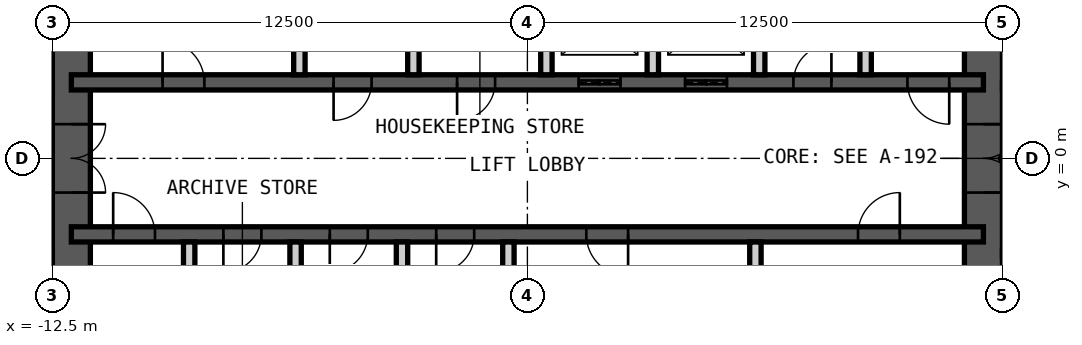
"""IFC4 building model, lengths in metres.
Left out: names, types, materials, properties, quantities, classifications, styles, units other than length and angle.
Written with IfcOpenShell. Run it as: python <this file> out.ifc"""

import sys

from ifc_helpers import new_model, si_unit, direction, frame, frame_2d, origin, place, context, subcontext, project, spatial, rectangle, extrude, element, fill, save


model = new_model("IFC4")
c1 = context("Model", 3, precision=1e-05, world=origin(), true_north=direction((0.0, 1.0)))
c2 = subcontext(c1, "Body", "Model", "MODEL_VIEW")
j1 = project(units=[si_unit("LENGTHUNIT", "METRE"), si_unit("PLANEANGLEUNIT", "RADIAN")], contexts=[c1])
p1 = place(None, origin())
s1 = spatial("IfcSite", under=j1, at=p1, CompositionType="ELEMENT")
p2 = place(p1, origin())
s2 = spatial("IfcBuilding", under=s1, at=p2, CompositionType="ELEMENT")
p3 = place(p2, frame((0.0, 0.0, 283.0)))
s3 = spatial("IfcBuildingStorey", under=s2, at=p3, CompositionType="ELEMENT", Elevation=283.0)
p4 = place(p3, frame((12.0, -9.0, 0.0), z_axis=(0.0, 0.0, 1.0), x_axis=(0.0, 1.0, 0.0)))
e1 = element("IfcWall", 1, at=p4, inside=s3, PredefinedType="SHEAR", context=c2, shape_type="SweptSolid", body=[
    extrude(rectangle(XDim=18.0, YDim=1.0, at=frame_2d((9.0, 0.0))), origin(), (0.0, 0.0, 1.0), 4.2),
])
p5 = place(p4, frame((8.1, 0.0, 0.0)))
e2 = element("IfcOpeningElement", 2, at=p5, cuts=e1, PredefinedType="OPENING", context=c2, shape_type="SweptSolid", body=[
    extrude(rectangle(XDim=1.8, YDim=2.1, at=frame_2d((0.9, 1.05))), frame((0.0, 0.51, 0.0), z_axis=(0.0, -1.0, 0.0), x_axis=(1.0, 0.0, 0.0)), (0.0, 0.0, 1.0), 1.02),
])
p6 = place(p3, frame((-12.0, -9.0, 0.0), z_axis=(0.0, 0.0, 1.0), x_axis=(0.0, 1.0, 0.0)))
e3 = element("IfcWall", 3, at=p6, inside=s3, PredefinedType="SHEAR", context=c2, shape_type="SweptSolid", body=[
    extrude(rectangle(XDim=18.0, YDim=1.0, at=frame_2d((9.0, 0.0))), origin(), (0.0, 0.0, 1.0), 4.2),
])
p7 = place(p6, frame((8.1, 0.0, 0.0)))
e4 = element("IfcOpeningElement", 4, at=p7, cuts=e3, PredefinedType="OPENING", context=c2, shape_type="SweptSolid", body=[
    extrude(rectangle(XDim=1.8, YDim=2.1, at=frame_2d((0.9, 1.05))), frame((0.0, 0.51, 0.0), z_axis=(0.0, -1.0, 0.0), x_axis=(1.0, 0.0, 0.0)), (0.0, 0.0, 1.0), 1.02),
])
p8 = place(p3, frame((-12.0, 2.0, 0.0), z_axis=(0.0, 0.0, 1.0), x_axis=(1.0, 0.0, 0.0)))
e5 = element("IfcWall", 5, at=p8, inside=s3, PredefinedType="SHEAR", context=c2, shape_type="SweptSolid", body=[
    extrude(rectangle(XDim=24.0, YDim=0.4, at=frame_2d((12.0, 0.0))), origin(), (0.0, 0.0, 1.0), 4.2),
])
p9 = place(p8, frame((2.4, 0.0, 0.0)))
e6 = element("IfcOpeningElement", 6, at=p9, cuts=e5, PredefinedType="OPENING", context=c2, shape_type="SweptSolid", body=[
    extrude(rectangle(XDim=1.1, YDim=2.1, at=frame_2d((0.55, 1.05))), frame((0.0, 0.21, 0.0), z_axis=(0.0, -1.0, 0.0), x_axis=(1.0, 0.0, 0.0)), (0.0, 0.0, 1.0), 0.42),
])
p10 = place(p8, frame((22.0, 0.0, 0.0)))
e7 = element("IfcOpeningElement", 7, at=p10, cuts=e5, PredefinedType="OPENING", context=c2, shape_type="SweptSolid", body=[
    extrude(rectangle(XDim=1.1, YDim=2.1, at=frame_2d((0.55, 1.05))), frame((0.0, 0.21, 0.0), z_axis=(0.0, -1.0, 0.0), x_axis=(1.0, 0.0, 0.0)), (0.0, 0.0, 1.0), 0.42),
])
p11 = place(p8, frame((10.15, 0.0, 0.0)))
e8 = element("IfcOpeningElement", 8, at=p11, cuts=e5, PredefinedType="OPENING", context=c2, shape_type="SweptSolid", body=[
    extrude(rectangle(XDim=1.0, YDim=2.1, at=frame_2d((0.5, 1.05))), frame((0.0, 0.21, 0.0), z_axis=(0.0, -1.0, 0.0), x_axis=(1.0, 0.0, 0.0)), (0.0, 0.0, 1.0), 0.42),
])
p12 = place(p8, frame((6.9, 0.0, 0.0)))
e9 = element("IfcOpeningElement", 9, at=p12, cuts=e5, PredefinedType="OPENING", context=c2, shape_type="SweptSolid", body=[
    extrude(rectangle(XDim=1.0, YDim=2.1, at=frame_2d((0.5, 1.05))), frame((0.0, 0.21, 0.0), z_axis=(0.0, -1.0, 0.0), x_axis=(1.0, 0.0, 0.0)), (0.0, 0.0, 1.0), 0.42),
])
p13 = place(p8, frame((13.35, 0.0, 0.0)))
e10 = element("IfcOpeningElement", 10, at=p13, cuts=e5, PredefinedType="OPENING", context=c2, shape_type="SweptSolid", body=[
    extrude(rectangle(XDim=1.1, YDim=2.4, at=frame_2d((0.55, 1.2))), frame((0.0, 0.21, 0.0), z_axis=(0.0, -1.0, 0.0), x_axis=(1.0, 0.0, 0.0)), (0.0, 0.0, 1.0), 0.42),
])
p14 = place(p8, frame((16.15, 0.0, 0.0)))
e11 = element("IfcOpeningElement", 11, at=p14, cuts=e5, PredefinedType="OPENING", context=c2, shape_type="SweptSolid", body=[
    extrude(rectangle(XDim=1.1, YDim=2.4, at=frame_2d((0.55, 1.2))), frame((0.0, 0.21, 0.0), z_axis=(0.0, -1.0, 0.0), x_axis=(1.0, 0.0, 0.0)), (0.0, 0.0, 1.0), 0.42),
])
p15 = place(p8, frame((19.0, 0.0, 0.0)))
e12 = element("IfcOpeningElement", 12, at=p15, cuts=e5, PredefinedType="OPENING", context=c2, shape_type="SweptSolid", body=[
    extrude(rectangle(XDim=1.0, YDim=2.1, at=frame_2d((0.5, 1.05))), frame((0.0, 0.21, 0.0), z_axis=(0.0, -1.0, 0.0), x_axis=(1.0, 0.0, 0.0)), (0.0, 0.0, 1.0), 0.42),
])
p16 = place(p3, frame((-12.0, -2.0, 0.0), z_axis=(0.0, 0.0, 1.0), x_axis=(1.0, 0.0, 0.0)))
e13 = element("IfcWall", 13, at=p16, inside=s3, PredefinedType="SHEAR", context=c2, shape_type="SweptSolid", body=[
    extrude(rectangle(XDim=24.0, YDim=0.4, at=frame_2d((12.0, 0.0))), origin(), (0.0, 0.0, 1.0), 4.2),
])
p17 = place(p16, frame((1.1, 0.0, 0.0)))
e14 = element("IfcOpeningElement", 14, at=p17, cuts=e13, PredefinedType="OPENING", context=c2, shape_type="SweptSolid", body=[
    extrude(rectangle(XDim=1.1, YDim=2.1, at=frame_2d((0.55, 1.05))), frame((0.0, 0.21, 0.0), z_axis=(0.0, -1.0, 0.0), x_axis=(1.0, 0.0, 0.0)), (0.0, 0.0, 1.0), 0.42),
])
p18 = place(p16, frame((13.55, 0.0, 0.0)))
e15 = element("IfcOpeningElement", 15, at=p18, cuts=e13, PredefinedType="OPENING", context=c2, shape_type="SweptSolid", body=[
    extrude(rectangle(XDim=1.1, YDim=2.1, at=frame_2d((0.55, 1.05))), frame((0.0, 0.21, 0.0), z_axis=(0.0, -1.0, 0.0), x_axis=(1.0, 0.0, 0.0)), (0.0, 0.0, 1.0), 0.42),
])
p19 = place(p16, frame((20.7, 0.0, 0.0)))
e16 = element("IfcOpeningElement", 16, at=p19, cuts=e13, PredefinedType="OPENING", context=c2, shape_type="SweptSolid", body=[
    extrude(rectangle(XDim=1.1, YDim=2.1, at=frame_2d((0.55, 1.05))), frame((0.0, 0.21, 0.0), z_axis=(0.0, -1.0, 0.0), x_axis=(1.0, 0.0, 0.0)), (0.0, 0.0, 1.0), 0.42),
])
p20 = place(p16, frame((4.0, 0.0, 0.0)))
e17 = element("IfcOpeningElement", 17, at=p20, cuts=e13, PredefinedType="OPENING", context=c2, shape_type="SweptSolid", body=[
    extrude(rectangle(XDim=1.0, YDim=2.1, at=frame_2d((0.5, 1.05))), frame((0.0, 0.21, 0.0), z_axis=(0.0, -1.0, 0.0), x_axis=(1.0, 0.0, 0.0)), (0.0, 0.0, 1.0), 0.42),
])
p21 = place(p16, frame((6.8, 0.0, 0.0)))
e18 = element("IfcOpeningElement", 18, at=p21, cuts=e13, PredefinedType="OPENING", context=c2, shape_type="SweptSolid", body=[
    extrude(rectangle(XDim=1.0, YDim=2.1, at=frame_2d((0.5, 1.05))), frame((0.0, 0.21, 0.0), z_axis=(0.0, -1.0, 0.0), x_axis=(1.0, 0.0, 0.0)), (0.0, 0.0, 1.0), 0.42),
])
p22 = place(p16, frame((9.6, 0.0, 0.0)))
e19 = element("IfcOpeningElement", 19, at=p22, cuts=e13, PredefinedType="OPENING", context=c2, shape_type="SweptSolid", body=[
    extrude(rectangle(XDim=1.0, YDim=2.1, at=frame_2d((0.5, 1.05))), frame((0.0, 0.21, 0.0), z_axis=(0.0, -1.0, 0.0), x_axis=(1.0, 0.0, 0.0)), (0.0, 0.0, 1.0), 0.42),
])
for number, where, z_axis, x_axis in (
    (20, (-6.0, 2.2, 0.0), (0.0, 0.0, 1.0), (0.0, 1.0, 0.0)),
    (21, (-3.0, 2.2, 0.0), (0.0, 0.0, 1.0), (0.0, 1.0, 0.0)),
    (22, (0.5, 2.2, 0.0), (0.0, 0.0, 1.0), (0.0, 1.0, 0.0)),
    (23, (3.3, 2.2, 0.0), (0.0, 0.0, 1.0), (0.0, 1.0, 0.0)),
    (24, (6.1, 2.2, 0.0), (0.0, 0.0, 1.0), (0.0, 1.0, 0.0)),
    (25, (8.9, 2.2, 0.0), (0.0, 0.0, 1.0), (0.0, 1.0, 0.0)),
    (26, (-8.9, -4.85, 0.0), (0.0, 0.0, 1.0), (0.0, 1.0, 0.0)),
    (27, (-6.1, -4.85, 0.0), (0.0, 0.0, 1.0), (0.0, 1.0, 0.0)),
    (28, (-3.3, -4.85, 0.0), (0.0, 0.0, 1.0), (0.0, 1.0, 0.0)),
    (29, (-0.5, -4.85, 0.0), (0.0, 0.0, 1.0), (0.0, 1.0, 0.0)),
    (30, (6.0, -4.85, 0.0), (0.0, 0.0, 1.0), (0.0, 1.0, 0.0)),
):
    element("IfcWall", number, at=place(p3, frame(where, z_axis=z_axis, x_axis=x_axis)), inside=s3, PredefinedType="PARTITIONING", context=c2, shape_type="SweptSolid", body=[
        extrude(rectangle(XDim=2.65, YDim=0.3, at=frame_2d((1.325, 0.0))), origin(), (0.0, 0.0, 1.0), 3.98),
    ])
p23 = place(p9, origin())
e31 = element("IfcDoor", 31, at=p23, inside=s3, OperationType="SINGLE_SWING_RIGHT", PredefinedType="DOOR", context=c2, shape_type="SweptSolid", body=[
    extrude(rectangle(XDim=1.1, YDim=2.1, at=frame_2d((0.55, 1.05))), frame((0.0, 0.025, 0.0), z_axis=(0.0, -1.0, 0.0), x_axis=(1.0, 0.0, 0.0)), (0.0, 0.0, 1.0), 0.05),
])
fill(e6, e31)
p24 = place(p17, origin())
e32 = element("IfcDoor", 32, at=p24, inside=s3, OperationType="SINGLE_SWING_RIGHT", PredefinedType="DOOR", context=c2, shape_type="SweptSolid", body=[
    extrude(rectangle(XDim=1.1, YDim=2.1, at=frame_2d((0.55, 1.05))), frame((0.0, 0.025, 0.0), z_axis=(0.0, -1.0, 0.0), x_axis=(1.0, 0.0, 0.0)), (0.0, 0.0, 1.0), 0.05),
])
fill(e14, e32)
p25 = place(p10, origin())
e33 = element("IfcDoor", 33, at=p25, inside=s3, OperationType="SINGLE_SWING_RIGHT", PredefinedType="DOOR", context=c2, shape_type="SweptSolid", body=[
    extrude(rectangle(XDim=1.1, YDim=2.1, at=frame_2d((0.55, 1.05))), frame((0.0, 0.025, 0.0), z_axis=(0.0, -1.0, 0.0), x_axis=(1.0, 0.0, 0.0)), (0.0, 0.0, 1.0), 0.05),
])
fill(e7, e33)
p26 = place(p11, origin())
e34 = element("IfcDoor", 34, at=p26, inside=s3, OperationType="SINGLE_SWING_LEFT", PredefinedType="DOOR", context=c2, shape_type="SweptSolid", body=[
    extrude(rectangle(XDim=1.0, YDim=2.1, at=frame_2d((0.5, 1.05))), frame((0.0, 0.025, 0.0), z_axis=(0.0, -1.0, 0.0), x_axis=(1.0, 0.0, 0.0)), (0.0, 0.0, 1.0), 0.05),
])
fill(e8, e34)
p27 = place(p18, origin())
e35 = element("IfcDoor", 35, at=p27, inside=s3, OperationType="SINGLE_SWING_RIGHT", PredefinedType="DOOR", context=c2, shape_type="SweptSolid", body=[
    extrude(rectangle(XDim=1.1, YDim=2.1, at=frame_2d((0.55, 1.05))), frame((0.0, 0.025, 0.0), z_axis=(0.0, -1.0, 0.0), x_axis=(1.0, 0.0, 0.0)), (0.0, 0.0, 1.0), 0.05),
])
fill(e15, e35)
p28 = place(p19, origin())
e36 = element("IfcDoor", 36, at=p28, inside=s3, OperationType="SINGLE_SWING_LEFT", PredefinedType="DOOR", context=c2, shape_type="SweptSolid", body=[
    extrude(rectangle(XDim=1.1, YDim=2.1, at=frame_2d((0.55, 1.05))), frame((0.0, 0.025, 0.0), z_axis=(0.0, -1.0, 0.0), x_axis=(1.0, 0.0, 0.0)), (0.0, 0.0, 1.0), 0.05),
])
fill(e16, e36)
p29 = place(p5, origin())
e37 = element("IfcDoor", 37, at=p29, inside=s3, OperationType="DOUBLE_DOOR_DOUBLE_SWING", PredefinedType="DOOR", context=c2, shape_type="SweptSolid", body=[
    extrude(rectangle(XDim=1.8, YDim=2.1, at=frame_2d((0.9, 1.05))), frame((0.0, 0.025, 0.0), z_axis=(0.0, -1.0, 0.0), x_axis=(1.0, 0.0, 0.0)), (0.0, 0.0, 1.0), 0.05),
])
fill(e2, e37)
p30 = place(p7, origin())
e38 = element("IfcDoor", 38, at=p30, inside=s3, OperationType="DOUBLE_DOOR_DOUBLE_SWING", PredefinedType="DOOR", context=c2, shape_type="SweptSolid", body=[
    extrude(rectangle(XDim=1.8, YDim=2.1, at=frame_2d((0.9, 1.05))), frame((0.0, 0.025, 0.0), z_axis=(0.0, -1.0, 0.0), x_axis=(1.0, 0.0, 0.0)), (0.0, 0.0, 1.0), 0.05),
])
fill(e4, e38)
p31 = place(p12, origin())
e39 = element("IfcDoor", 39, at=p31, inside=s3, OperationType="SINGLE_SWING_LEFT", PredefinedType="DOOR", context=c2, shape_type="SweptSolid", body=[
    extrude(rectangle(XDim=1.0, YDim=2.1, at=frame_2d((0.5, 1.05))), frame((0.0, 0.025, 0.0), z_axis=(0.0, -1.0, 0.0), x_axis=(1.0, 0.0, 0.0)), (0.0, 0.0, 1.0), 0.05),
])
fill(e9, e39)
p32 = place(p13, origin())
e40 = element("IfcDoor", 40, at=p32, inside=s3, OperationType="DOUBLE_DOOR_SLIDING", PredefinedType="DOOR", context=c2, shape_type="SweptSolid", body=[
    extrude(rectangle(XDim=1.1, YDim=2.4, at=frame_2d((0.55, 1.2))), frame((0.0, 0.025, 0.0), z_axis=(0.0, -1.0, 0.0), x_axis=(1.0, 0.0, 0.0)), (0.0, 0.0, 1.0), 0.05),
])
fill(e10, e40)
p33 = place(p14, origin())
e41 = element("IfcDoor", 41, at=p33, inside=s3, OperationType="DOUBLE_DOOR_SLIDING", PredefinedType="DOOR", context=c2, shape_type="SweptSolid", body=[
    extrude(rectangle(XDim=1.1, YDim=2.4, at=frame_2d((0.55, 1.2))), frame((0.0, 0.025, 0.0), z_axis=(0.0, -1.0, 0.0), x_axis=(1.0, 0.0, 0.0)), (0.0, 0.0, 1.0), 0.05),
])
fill(e11, e41)
p34 = place(p15, origin())
e42 = element("IfcDoor", 42, at=p34, inside=s3, OperationType="SINGLE_SWING_LEFT", PredefinedType="DOOR", context=c2, shape_type="SweptSolid", body=[
    extrude(rectangle(XDim=1.0, YDim=2.1, at=frame_2d((0.5, 1.05))), frame((0.0, 0.025, 0.0), z_axis=(0.0, -1.0, 0.0), x_axis=(1.0, 0.0, 0.0)), (0.0, 0.0, 1.0), 0.05),
])
fill(e12, e42)
p35 = place(p20, origin())
e43 = element("IfcDoor", 43, at=p35, inside=s3, OperationType="SINGLE_SWING_LEFT", PredefinedType="DOOR", context=c2, shape_type="SweptSolid", body=[
    extrude(rectangle(XDim=1.0, YDim=2.1, at=frame_2d((0.5, 1.05))), frame((0.0, 0.025, 0.0), z_axis=(0.0, -1.0, 0.0), x_axis=(1.0, 0.0, 0.0)), (0.0, 0.0, 1.0), 0.05),
])
fill(e17, e43)
p36 = place(p21, origin())
e44 = element("IfcDoor", 44, at=p36, inside=s3, OperationType="SINGLE_SWING_LEFT", PredefinedType="DOOR", context=c2, shape_type="SweptSolid", body=[
    extrude(rectangle(XDim=1.0, YDim=2.1, at=frame_2d((0.5, 1.05))), frame((0.0, 0.025, 0.0), z_axis=(0.0, -1.0, 0.0), x_axis=(1.0, 0.0, 0.0)), (0.0, 0.0, 1.0), 0.05),
])
fill(e18, e44)
p37 = place(p22, origin())
e45 = element("IfcDoor", 45, at=p37, inside=s3, OperationType="SINGLE_SWING_LEFT", PredefinedType="DOOR", context=c2, shape_type="SweptSolid", body=[
    extrude(rectangle(XDim=1.0, YDim=2.1, at=frame_2d((0.5, 1.05))), frame((0.0, 0.025, 0.0), z_axis=(0.0, -1.0, 0.0), x_axis=(1.0, 0.0, 0.0)), (0.0, 0.0, 1.0), 0.05),
])
fill(e19, e45)
save(model, sys.argv[1])
